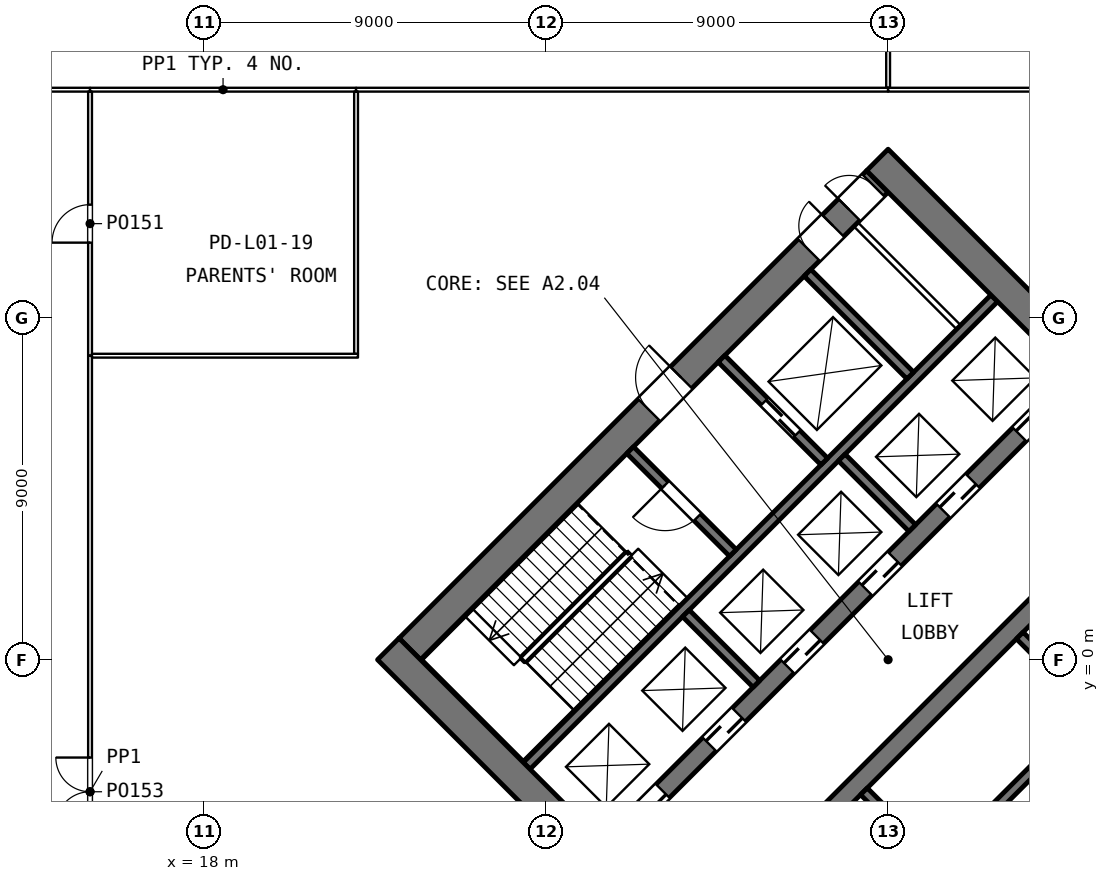
"""IFC4 building model, lengths in metres.
Left out: names, types, materials, properties, quantities, classifications, styles, units other than length and angle.
Written with IfcOpenShell. Run it as: python <this file> out.ifc"""

import sys

from ifc_helpers import new_model, si_unit, direction, frame, frame_2d, origin, place, context, subcontext, project, spatial, rectangle, extrude, element, fill, save


model = new_model("IFC4")
c1 = context("Model", 3, precision=1e-05, world=origin(), true_north=direction((0.0, 1.0)))
c2 = subcontext(c1, "Body", "Model", "MODEL_VIEW")
j1 = project(units=[si_unit("LENGTHUNIT", "METRE"), si_unit("PLANEANGLEUNIT", "RADIAN")], contexts=[c1])
p1 = place(None, origin())
s1 = spatial("IfcSite", under=j1, at=p1, CompositionType="ELEMENT")
p2 = place(p1, origin())
s2 = spatial("IfcBuilding", under=s1, at=p2, CompositionType="ELEMENT")
p3 = place(p2, frame((0.0, 0.0, 7.2)))
s3 = spatial("IfcBuildingStorey", under=s2, at=p3, CompositionType="ELEMENT", Elevation=7.2)
p4 = place(p3, frame((36.283, -12.586, 0.0), z_axis=(0.0, 0.0, 1.0), x_axis=(0.707106781187, 0.707106781187, 0.0)))
e1 = element("IfcWall", 1, at=p4, inside=s3, PredefinedType="SHEAR", context=c2, shape_type="SweptSolid", body=[
    extrude(rectangle(XDim=17.4, YDim=0.8, at=frame_2d((8.7, 0.0))), origin(), (0.0, 0.0, 1.0), 5.1),
])
p5 = place(p4, frame((7.3, 0.0, 0.0)))
e2 = element("IfcOpeningElement", 2, at=p5, cuts=e1, PredefinedType="OPENING", context=c2, shape_type="SweptSolid", body=[
    extrude(rectangle(XDim=1.2, YDim=2.1, at=frame_2d((0.6, 1.05))), frame((0.0, 0.41, 0.0), z_axis=(0.0, -1.0, 0.0), x_axis=(1.0, 0.0, 0.0)), (0.0, 0.0, 1.0), 0.82),
])
p6 = place(p4, frame((1.0, 0.0, 0.0)))
e3 = element("IfcOpeningElement", 3, at=p6, cuts=e1, PredefinedType="OPENING", context=c2, shape_type="SweptSolid", body=[
    extrude(rectangle(XDim=1.0, YDim=2.1, at=frame_2d((0.5, 1.05))), frame((0.0, 0.41, 0.0), z_axis=(0.0, -1.0, 0.0), x_axis=(1.0, 0.0, 0.0)), (0.0, 0.0, 1.0), 0.82),
])
p7 = place(p3, frame((33.207, -9.51, 0.0), z_axis=(0.0, 0.0, 1.0), x_axis=(0.707106781187, 0.707106781187, 0.0)))
e4 = element("IfcWall", 4, at=p7, inside=s3, PredefinedType="SHEAR", context=c2, shape_type="SweptSolid", body=[
    extrude(rectangle(XDim=17.4, YDim=0.25, at=frame_2d((8.7, 0.0))), origin(), (0.0, 0.0, 1.0), 5.1),
])
p8 = place(p3, frame((31.086, -7.389, 0.0), z_axis=(0.0, 0.0, 1.0), x_axis=(0.707106781187, 0.707106781187, 0.0)))
e5 = element("IfcWall", 5, at=p8, inside=s3, PredefinedType="SHEAR", context=c2, shape_type="SweptSolid", body=[
    extrude(rectangle(XDim=17.4, YDim=0.5, at=frame_2d((8.7, 0.0))), origin(), (0.0, 0.0, 1.0), 5.1),
])
p9 = place(p8, frame((12.45, 0.0, 0.0)))
e6 = element("IfcOpeningElement", 6, at=p9, cuts=e5, PredefinedType="OPENING", context=c2, shape_type="SweptSolid", body=[
    extrude(rectangle(XDim=1.2, YDim=2.1, at=frame_2d((0.6, 1.05))), frame((0.0, 0.26, 0.0), z_axis=(0.0, -1.0, 0.0), x_axis=(1.0, 0.0, 0.0)), (0.0, 0.0, 1.0), 0.52),
])
p10 = place(p8, frame((15.5, 0.0, 0.0)))
e7 = element("IfcOpeningElement", 7, at=p10, cuts=e5, PredefinedType="OPENING", context=c2, shape_type="SweptSolid", body=[
    extrude(rectangle(XDim=1.0, YDim=2.1, at=frame_2d((0.5, 1.05))), frame((0.0, 0.26, 0.0), z_axis=(0.0, -1.0, 0.0), x_axis=(1.0, 0.0, 0.0)), (0.0, 0.0, 1.0), 0.52),
])
p11 = place(p3, frame((28.611, -4.914, 0.0), z_axis=(0.0, 0.0, 1.0), x_axis=(0.707106781187, 0.707106781187, 0.0)))
e8 = element("IfcWall", 8, at=p11, inside=s3, PredefinedType="SHEAR", context=c2, shape_type="SweptSolid", body=[
    extrude(rectangle(XDim=17.4, YDim=0.5, at=frame_2d((8.7, 0.0))), origin(), (0.0, 0.0, 1.0), 5.1),
])
p12 = place(p11, frame((0.962, 0.0, 0.0)))
e9 = element("IfcOpeningElement", 9, at=p12, cuts=e8, PredefinedType="OPENING", context=c2, shape_type="SweptSolid", body=[
    extrude(rectangle(XDim=1.1, YDim=2.1, at=frame_2d((0.55, 1.05))), frame((0.0, 0.26, 0.0), z_axis=(0.0, -1.0, 0.0), x_axis=(1.0, 0.0, 0.0)), (0.0, 0.0, 1.0), 0.52),
])
p13 = place(p11, frame((3.8, 0.0, 0.0)))
e10 = element("IfcOpeningElement", 10, at=p13, cuts=e8, PredefinedType="OPENING", context=c2, shape_type="SweptSolid", body=[
    extrude(rectangle(XDim=1.1, YDim=2.1, at=frame_2d((0.55, 1.05))), frame((0.0, 0.26, 0.0), z_axis=(0.0, -1.0, 0.0), x_axis=(1.0, 0.0, 0.0)), (0.0, 0.0, 1.0), 0.52),
])
p14 = place(p11, frame((6.7, 0.0, 0.0)))
e11 = element("IfcOpeningElement", 11, at=p14, cuts=e8, PredefinedType="OPENING", context=c2, shape_type="SweptSolid", body=[
    extrude(rectangle(XDim=1.1, YDim=2.1, at=frame_2d((0.55, 1.05))), frame((0.0, 0.26, 0.0), z_axis=(0.0, -1.0, 0.0), x_axis=(1.0, 0.0, 0.0)), (0.0, 0.0, 1.0), 0.52),
])
p15 = place(p11, frame((9.6, 0.0, 0.0)))
e12 = element("IfcOpeningElement", 12, at=p15, cuts=e8, PredefinedType="OPENING", context=c2, shape_type="SweptSolid", body=[
    extrude(rectangle(XDim=1.1, YDim=2.1, at=frame_2d((0.55, 1.05))), frame((0.0, 0.26, 0.0), z_axis=(0.0, -1.0, 0.0), x_axis=(1.0, 0.0, 0.0)), (0.0, 0.0, 1.0), 0.52),
])
p16 = place(p11, frame((12.5, 0.0, 0.0)))
e13 = element("IfcOpeningElement", 13, at=p16, cuts=e8, PredefinedType="OPENING", context=c2, shape_type="SweptSolid", body=[
    extrude(rectangle(XDim=1.1, YDim=2.1, at=frame_2d((0.55, 1.05))), frame((0.0, 0.26, 0.0), z_axis=(0.0, -1.0, 0.0), x_axis=(1.0, 0.0, 0.0)), (0.0, 0.0, 1.0), 0.52),
])
p17 = place(p11, frame((15.337, 0.0, 0.0)))
e14 = element("IfcOpeningElement", 14, at=p17, cuts=e8, PredefinedType="OPENING", context=c2, shape_type="SweptSolid", body=[
    extrude(rectangle(XDim=1.1, YDim=2.1, at=frame_2d((0.55, 1.05))), frame((0.0, 0.26, 0.0), z_axis=(0.0, -1.0, 0.0), x_axis=(1.0, 0.0, 0.0)), (0.0, 0.0, 1.0), 0.52),
])
p18 = place(p3, frame((26.49, -2.793, 0.0), z_axis=(0.0, 0.0, 1.0), x_axis=(0.707106781187, 0.707106781187, 0.0)))
e15 = element("IfcWall", 15, at=p18, inside=s3, PredefinedType="SHEAR", context=c2, shape_type="SweptSolid", body=[
    extrude(rectangle(XDim=17.4, YDim=0.25, at=frame_2d((8.7, 0.0))), origin(), (0.0, 0.0, 1.0), 5.1),
])
p19 = place(p3, frame((23.414, 0.283, 0.0), z_axis=(0.0, 0.0, 1.0), x_axis=(0.707106781187, 0.707106781187, 0.0)))
e16 = element("IfcWall", 16, at=p19, inside=s3, PredefinedType="SHEAR", context=c2, shape_type="SweptSolid", body=[
    extrude(rectangle(XDim=17.4, YDim=0.8, at=frame_2d((8.7, 0.0))), origin(), (0.0, 0.0, 1.0), 5.1),
])
p20 = place(p19, frame((8.9, 0.0, 0.0)))
e17 = element("IfcOpeningElement", 17, at=p20, cuts=e16, PredefinedType="OPENING", context=c2, shape_type="SweptSolid", body=[
    extrude(rectangle(XDim=1.2, YDim=2.1, at=frame_2d((0.6, 1.05))), frame((0.0, 0.41, 0.0), z_axis=(0.0, -1.0, 0.0), x_axis=(1.0, 0.0, 0.0)), (0.0, 0.0, 1.0), 0.82),
])
p21 = place(p19, frame((14.85, 0.0, 0.0)))
e18 = element("IfcOpeningElement", 18, at=p21, cuts=e16, PredefinedType="OPENING", context=c2, shape_type="SweptSolid", body=[
    extrude(rectangle(XDim=0.9, YDim=2.1, at=frame_2d((0.45, 1.05))), frame((0.0, 0.41, 0.0), z_axis=(0.0, -1.0, 0.0), x_axis=(1.0, 0.0, 0.0)), (0.0, 0.0, 1.0), 0.82),
])
p22 = place(p19, frame((16.35, 0.0, 0.0)))
e19 = element("IfcOpeningElement", 19, at=p22, cuts=e16, PredefinedType="OPENING", context=c2, shape_type="SweptSolid", body=[
    extrude(rectangle(XDim=0.9, YDim=2.1, at=frame_2d((0.45, 1.05))), frame((0.0, 0.41, 0.0), z_axis=(0.0, -1.0, 0.0), x_axis=(1.0, 0.0, 0.0)), (0.0, 0.0, 1.0), 0.82),
])
p23 = place(p3, frame((36.283, -13.152, 0.0), z_axis=(0.0, 0.0, 1.0), x_axis=(-0.707106781187, 0.707106781187, 0.0)))
e20 = element("IfcWall", 20, at=p23, inside=s3, PredefinedType="SHEAR", context=c2, shape_type="SweptSolid", body=[
    extrude(rectangle(XDim=19.0, YDim=0.8, at=frame_2d((9.5, 0.0))), origin(), (0.0, 0.0, 1.0), 5.1),
])
p24 = place(p23, frame((8.3, 0.0, 0.0)))
e21 = element("IfcOpeningElement", 21, at=p24, cuts=e20, PredefinedType="OPENING", context=c2, shape_type="SweptSolid", body=[
    extrude(rectangle(XDim=2.4, YDim=2.1, at=frame_2d((1.2, 1.05))), frame((0.0, 0.41, 0.0), z_axis=(0.0, -1.0, 0.0), x_axis=(1.0, 0.0, 0.0)), (0.0, 0.0, 1.0), 0.82),
])
for number, where, z_axis, x_axis in (
    (22, (37.22, -5.321, 0.0), (0.0, 0.0, 1.0), (-0.707, 0.707, 0.0)),
    (23, (32.535, -0.636, 0.0), (0.0, 0.0, 1.0), (-0.707, 0.707, 0.0)),
):
    element("IfcWall", number, at=place(p3, frame(where, z_axis=z_axis, x_axis=x_axis)), inside=s3, PredefinedType="SHEAR", context=c2, shape_type="SweptSolid", body=[
        extrude(rectangle(XDim=2.625, YDim=0.25, at=frame_2d((1.312, 0.0))), origin(), (0.0, 0.0, 1.0), 5.1),
    ])
p25 = place(p3, frame((31.917, 2.811, 0.0), z_axis=(0.0, 0.0, 1.0), x_axis=(-0.707106781187, 0.707106781187, 0.0)))
e24 = element("IfcWall", 24, at=p25, inside=s3, PredefinedType="SHEAR", context=c2, shape_type="SweptSolid", body=[
    extrude(rectangle(XDim=3.825, YDim=0.25, at=frame_2d((1.913, 0.0))), origin(), (0.0, 0.0, 1.0), 5.1),
])
p26 = place(p25, frame((1.325, 0.0, 0.0)))
e25 = element("IfcOpeningElement", 25, at=p26, cuts=e24, PredefinedType="OPENING", context=c2, shape_type="SweptSolid", body=[
    extrude(rectangle(XDim=1.2, YDim=2.1, at=frame_2d((0.6, 1.05))), frame((0.0, 0.135, 0.0), z_axis=(0.0, -1.0, 0.0), x_axis=(1.0, 0.0, 0.0)), (0.0, 0.0, 1.0), 0.27),
])
p27 = place(p3, frame((34.321, 5.215, 0.0), z_axis=(0.0, 0.0, 1.0), x_axis=(-0.707074866995, 0.707138693938, 0.0)))
e26 = element("IfcWall", 26, at=p27, inside=s3, PredefinedType="SHEAR", context=c2, shape_type="SweptSolid", body=[
    extrude(rectangle(XDim=3.825, YDim=0.25, at=frame_2d((1.913, 0.0))), origin(), (0.0, 0.0, 1.0), 5.1),
])
p28 = place(p27, frame((1.025, 0.0, 0.0)))
e27 = element("IfcOpeningElement", 27, at=p28, cuts=e26, PredefinedType="OPENING", context=c2, shape_type="SweptSolid", body=[
    extrude(rectangle(XDim=1.2, YDim=2.1, at=frame_2d((0.6, 1.05))), frame((0.0, 0.135, 0.0), z_axis=(0.0, -1.0, 0.0), x_axis=(1.0, 0.0, 0.0)), (0.0, 0.0, 1.0), 0.27),
])
for number, where, z_axis, x_axis in (
    (28, (41.321, -1.22, 0.0), (0.0, 0.0, 1.0), (-0.707, 0.707, 0.0)),
    (29, (36.636, 3.465, 0.0), (0.0, 0.0, 1.0), (-0.707, 0.707, 0.0)),
):
    element("IfcWall", number, at=place(p3, frame(where, z_axis=z_axis, x_axis=x_axis)), inside=s3, PredefinedType="SHEAR", context=c2, shape_type="SweptSolid", body=[
        extrude(rectangle(XDim=2.625, YDim=0.25, at=frame_2d((1.312, 0.0))), origin(), (0.0, 0.0, 1.0), 5.1),
    ])
p29 = place(p3, frame((36.583, 7.478, 0.0), z_axis=(0.0, 0.0, 1.0), x_axis=(-0.707138693938, 0.707074866995, 0.0)))
e30 = element("IfcWall", 30, at=p29, inside=s3, PredefinedType="SHEAR", context=c2, shape_type="SweptSolid", body=[
    extrude(rectangle(XDim=3.825, YDim=0.25, at=frame_2d((1.913, 0.0))), origin(), (0.0, 0.0, 1.0), 5.1),
])
p30 = place(p3, frame((37.856, 8.75, 0.0), z_axis=(0.0, 0.0, 1.0), x_axis=(-0.707106781187, 0.707106781187, 0.0)))
e31 = element("IfcWall", 31, at=p30, inside=s3, PredefinedType="PARTITIONING", context=c2, shape_type="SweptSolid", body=[
    extrude(rectangle(XDim=3.825, YDim=0.15, at=frame_2d((1.913, 0.0))), origin(), (0.0, 0.0, 1.0), 5.1),
])
p31 = place(p3, frame((49.152, -0.283, 0.0), z_axis=(0.0, 0.0, 1.0), x_axis=(-0.707106781187, 0.707106781187, 0.0)))
e32 = element("IfcWall", 32, at=p31, inside=s3, PredefinedType="SHEAR", context=c2, shape_type="SweptSolid", body=[
    extrude(rectangle(XDim=19.0, YDim=0.8, at=frame_2d((9.5, 0.0))), origin(), (0.0, 0.0, 1.0), 5.1),
])
p32 = place(p31, frame((8.3, 0.0, 0.0)))
e33 = element("IfcOpeningElement", 33, at=p32, cuts=e32, PredefinedType="OPENING", context=c2, shape_type="SweptSolid", body=[
    extrude(rectangle(XDim=2.4, YDim=2.1, at=frame_2d((1.2, 1.05))), frame((0.0, 0.41, 0.0), z_axis=(0.0, -1.0, 0.0), x_axis=(1.0, 0.0, 0.0)), (0.0, 0.0, 1.0), 0.82),
])
p33 = place(p3, frame((36.0, 15.05, 0.0), z_axis=(0.0, 0.0, 1.0), x_axis=(0.0, 1.0, 0.0)))
e34 = element("IfcWall", 34, at=p33, inside=s3, PredefinedType="PARTITIONING", context=c2, shape_type="SweptSolid", body=[
    extrude(rectangle(XDim=17.55, YDim=0.1, at=frame_2d((8.775, 0.0))), origin(), (0.0, 0.0, 1.0), 4.11),
])
p34 = place(p33, frame((6.739, 0.0, 0.0)))
e35 = element("IfcOpeningElement", 35, at=p34, cuts=e34, PredefinedType="OPENING", context=c2, shape_type="SweptSolid", body=[
    extrude(rectangle(XDim=1.8, YDim=2.1, at=frame_2d((0.9, 1.05))), frame((0.0, 0.06, 0.0), z_axis=(0.0, -1.0, 0.0), x_axis=(1.0, 0.0, 0.0)), (0.0, 0.0, 1.0), 0.12),
])
p35 = place(p3, frame((-15.0, 15.0, 0.0), z_axis=(0.0, 0.0, 1.0), x_axis=(1.0, 0.0, 0.0)))
e36 = element("IfcWall", 36, at=p35, inside=s3, PredefinedType="PARTITIONING", context=c2, shape_type="SweptSolid", body=[
    extrude(rectangle(XDim=30.0, YDim=0.1, at=frame_2d((15.0, 0.0))), origin(), (0.0, 0.0, 1.0), 5.1),
])
p36 = place(p35, frame((8.58, 0.0, 0.0)))
e37 = element("IfcOpeningElement", 37, at=p36, cuts=e36, PredefinedType="OPENING", context=c2, shape_type="SweptSolid", body=[
    extrude(rectangle(XDim=1.8, YDim=2.1, at=frame_2d((0.9, 1.05))), frame((0.0, 0.06, 0.0), z_axis=(0.0, -1.0, 0.0), x_axis=(1.0, 0.0, 0.0)), (0.0, 0.0, 1.0), 0.12),
])
p37 = place(p35, frame((19.62, 0.0, 0.0)))
e38 = element("IfcOpeningElement", 38, at=p37, cuts=e36, PredefinedType="OPENING", context=c2, shape_type="SweptSolid", body=[
    extrude(rectangle(XDim=1.8, YDim=2.1, at=frame_2d((0.9, 1.05))), frame((0.0, 0.06, 0.0), z_axis=(0.0, -1.0, 0.0), x_axis=(1.0, 0.0, 0.0)), (0.0, 0.0, 1.0), 0.12),
])
p38 = place(p3, frame((15.0, 15.0, 0.0), z_axis=(0.0, 0.0, 1.0), x_axis=(1.0, 0.0, 0.0)))
e39 = element("IfcWall", 39, at=p38, inside=s3, PredefinedType="PARTITIONING", context=c2, shape_type="SweptSolid", body=[
    extrude(rectangle(XDim=7.0, YDim=0.1, at=frame_2d((3.5, 0.0))), origin(), (0.0, 0.0, 1.0), 5.1),
])
p39 = place(p3, frame((22.0, 15.0, 0.0), z_axis=(0.0, 0.0, 1.0), x_axis=(1.0, 0.0, 0.0)))
e40 = element("IfcWall", 40, at=p39, inside=s3, PredefinedType="PARTITIONING", context=c2, shape_type="SweptSolid", body=[
    extrude(rectangle(XDim=14.0, YDim=0.1, at=frame_2d((7.0, 0.0))), origin(), (0.0, 0.0, 1.0), 5.1),
])
p40 = place(p3, frame((36.0, 15.0, 0.0), z_axis=(0.0, 0.0, 1.0), x_axis=(1.0, 0.0, 0.0)))
e41 = element("IfcWall", 41, at=p40, inside=s3, PredefinedType="PARTITIONING", context=c2, shape_type="SweptSolid", body=[
    extrude(rectangle(XDim=16.0, YDim=0.1, at=frame_2d((8.0, 0.0))), origin(), (0.0, 0.0, 1.0), 5.1),
])
p41 = place(p3, frame((15.0, 8.0, 0.0), z_axis=(0.0, 0.0, 1.0), x_axis=(0.0, 1.0, 0.0)))
e42 = element("IfcWall", 42, at=p41, inside=s3, PredefinedType="PARTITIONING", context=c2, shape_type="SweptSolid", body=[
    extrude(rectangle(XDim=6.95, YDim=0.1, at=frame_2d((3.475, 0.0))), origin(), (0.0, 0.0, 1.0), 5.1),
])
p42 = place(p41, frame((2.975, 0.0, 0.0)))
e43 = element("IfcOpeningElement", 43, at=p42, cuts=e42, PredefinedType="OPENING", context=c2, shape_type="SweptSolid", body=[
    extrude(rectangle(XDim=1.0, YDim=2.1, at=frame_2d((0.5, 1.05))), frame((0.0, 0.06, 0.0), z_axis=(0.0, -1.0, 0.0), x_axis=(1.0, 0.0, 0.0)), (0.0, 0.0, 1.0), 0.12),
])
p43 = place(p3, frame((15.0, -14.95, 0.0), z_axis=(0.0, 0.0, 1.0), x_axis=(0.0, 1.0, 0.0)))
e44 = element("IfcWall", 44, at=p43, inside=s3, PredefinedType="PARTITIONING", context=c2, shape_type="SweptSolid", body=[
    extrude(rectangle(XDim=22.95, YDim=0.1, at=frame_2d((11.475, 0.0))), origin(), (0.0, 0.0, 1.0), 5.1),
])
p44 = place(p43, frame((10.575, 0.0, 0.0)))
e45 = element("IfcOpeningElement", 45, at=p44, cuts=e44, PredefinedType="OPENING", context=c2, shape_type="SweptSolid", body=[
    extrude(rectangle(XDim=1.8, YDim=2.1, at=frame_2d((0.9, 1.05))), frame((0.0, 0.06, 0.0), z_axis=(0.0, -1.0, 0.0), x_axis=(1.0, 0.0, 0.0)), (0.0, 0.0, 1.0), 0.12),
])
p45 = place(p3, frame((15.05, 8.0, 0.0), z_axis=(0.0, 0.0, 1.0), x_axis=(1.0, 0.0, 0.0)))
e46 = element("IfcWall", 46, at=p45, inside=s3, PredefinedType="PARTITIONING", context=c2, shape_type="SweptSolid", body=[
    extrude(rectangle(XDim=7.0, YDim=0.1, at=frame_2d((3.5, 0.0))), origin(), (0.0, 0.0, 1.0), 5.1),
])
p46 = place(p3, frame((22.0, 8.05, 0.0), z_axis=(0.0, 0.0, 1.0), x_axis=(0.0, 1.0, 0.0)))
e47 = element("IfcWall", 47, at=p46, inside=s3, PredefinedType="PARTITIONING", context=c2, shape_type="SweptSolid", body=[
    extrude(rectangle(XDim=6.9, YDim=0.1, at=frame_2d((3.45, 0.0))), origin(), (0.0, 0.0, 1.0), 5.1),
])
p47 = place(p12, origin())
e48 = element("IfcDoor", 48, at=p47, inside=s3, OperationType="SLIDING_TO_LEFT", PredefinedType="DOOR", context=c2, shape_type="SweptSolid", body=[
    extrude(rectangle(XDim=1.1, YDim=2.1, at=frame_2d((0.55, 1.05))), frame((0.0, 0.025, 0.0), z_axis=(0.0, -1.0, 0.0), x_axis=(1.0, 0.0, 0.0)), (0.0, 0.0, 1.0), 0.05),
])
fill(e9, e48)
p48 = place(p13, origin())
e49 = element("IfcDoor", 49, at=p48, inside=s3, OperationType="SLIDING_TO_LEFT", PredefinedType="DOOR", context=c2, shape_type="SweptSolid", body=[
    extrude(rectangle(XDim=1.1, YDim=2.1, at=frame_2d((0.55, 1.05))), frame((0.0, 0.025, 0.0), z_axis=(0.0, -1.0, 0.0), x_axis=(1.0, 0.0, 0.0)), (0.0, 0.0, 1.0), 0.05),
])
fill(e10, e49)
p49 = place(p14, origin())
e50 = element("IfcDoor", 50, at=p49, inside=s3, OperationType="SLIDING_TO_LEFT", PredefinedType="DOOR", context=c2, shape_type="SweptSolid", body=[
    extrude(rectangle(XDim=1.1, YDim=2.1, at=frame_2d((0.55, 1.05))), frame((0.0, 0.025, 0.0), z_axis=(0.0, -1.0, 0.0), x_axis=(1.0, 0.0, 0.0)), (0.0, 0.0, 1.0), 0.05),
])
fill(e11, e50)
p50 = place(p15, origin())
e51 = element("IfcDoor", 51, at=p50, inside=s3, OperationType="SLIDING_TO_LEFT", PredefinedType="DOOR", context=c2, shape_type="SweptSolid", body=[
    extrude(rectangle(XDim=1.1, YDim=2.1, at=frame_2d((0.55, 1.05))), frame((0.0, 0.025, 0.0), z_axis=(0.0, -1.0, 0.0), x_axis=(1.0, 0.0, 0.0)), (0.0, 0.0, 1.0), 0.05),
])
fill(e12, e51)
p51 = place(p16, origin())
e52 = element("IfcDoor", 52, at=p51, inside=s3, OperationType="SLIDING_TO_LEFT", PredefinedType="DOOR", context=c2, shape_type="SweptSolid", body=[
    extrude(rectangle(XDim=1.1, YDim=2.1, at=frame_2d((0.55, 1.05))), frame((0.0, 0.025, 0.0), z_axis=(0.0, -1.0, 0.0), x_axis=(1.0, 0.0, 0.0)), (0.0, 0.0, 1.0), 0.05),
])
fill(e13, e52)
p52 = place(p17, origin())
e53 = element("IfcDoor", 53, at=p52, inside=s3, OperationType="SLIDING_TO_LEFT", PredefinedType="DOOR", context=c2, shape_type="SweptSolid", body=[
    extrude(rectangle(XDim=1.1, YDim=2.1, at=frame_2d((0.55, 1.05))), frame((0.0, 0.025, 0.0), z_axis=(0.0, -1.0, 0.0), x_axis=(1.0, 0.0, 0.0)), (0.0, 0.0, 1.0), 0.05),
])
fill(e14, e53)
p53 = place(p28, origin())
e54 = element("IfcDoor", 54, at=p53, inside=s3, OperationType="SLIDING_TO_LEFT", PredefinedType="DOOR", context=c2, shape_type="SweptSolid", body=[
    extrude(rectangle(XDim=1.2, YDim=2.1, at=frame_2d((0.6, 1.05))), frame((0.0, 0.025, 0.0), z_axis=(0.0, -1.0, 0.0), x_axis=(1.0, 0.0, 0.0)), (0.0, 0.0, 1.0), 0.05),
])
fill(e27, e54)
p54 = place(p26, origin())
e55 = element("IfcDoor", 55, at=p54, inside=s3, OperationType="SINGLE_SWING_RIGHT", PredefinedType="DOOR", context=c2, shape_type="SweptSolid", body=[
    extrude(rectangle(XDim=1.2, YDim=2.1, at=frame_2d((0.6, 1.05))), frame((0.0, 0.025, 0.0), z_axis=(0.0, -1.0, 0.0), x_axis=(1.0, 0.0, 0.0)), (0.0, 0.0, 1.0), 0.05),
])
fill(e25, e55)
p55 = place(p20, origin())
e56 = element("IfcDoor", 56, at=p55, inside=s3, OperationType="SINGLE_SWING_RIGHT", PredefinedType="DOOR", context=c2, shape_type="SweptSolid", body=[
    extrude(rectangle(XDim=1.2, YDim=2.1, at=frame_2d((0.6, 1.05))), frame((0.0, -0.225, 0.0), z_axis=(0.0, -1.0, 0.0), x_axis=(1.0, 0.0, 0.0)), (0.0, 0.0, 1.0), 0.05),
])
fill(e17, e56)
p56 = place(p21, origin())
e57 = element("IfcDoor", 57, at=p56, inside=s3, OperationType="SINGLE_SWING_RIGHT", PredefinedType="DOOR", context=c2, shape_type="SweptSolid", body=[
    extrude(rectangle(XDim=0.9, YDim=2.1, at=frame_2d((0.45, 1.05))), frame((0.0, -0.225, 0.0), z_axis=(0.0, -1.0, 0.0), x_axis=(1.0, 0.0, 0.0)), (0.0, 0.0, 1.0), 0.05),
])
fill(e18, e57)
p57 = place(p22, origin())
e58 = element("IfcDoor", 58, at=p57, inside=s3, OperationType="SINGLE_SWING_LEFT", PredefinedType="DOOR", context=c2, shape_type="SweptSolid", body=[
    extrude(rectangle(XDim=0.9, YDim=2.1, at=frame_2d((0.45, 1.05))), frame((0.0, -0.225, 0.0), z_axis=(0.0, -1.0, 0.0), x_axis=(1.0, 0.0, 0.0)), (0.0, 0.0, 1.0), 0.05),
])
fill(e19, e58)
p58 = place(p42, origin())
e59 = element("IfcDoor", 59, at=p58, inside=s3, OperationType="SINGLE_SWING_LEFT", PredefinedType="DOOR", context=c2, shape_type="SweptSolid", body=[
    extrude(rectangle(XDim=1.0, YDim=2.1, at=frame_2d((0.5, 1.05))), frame((0.0, 0.025, 0.0), z_axis=(0.0, -1.0, 0.0), x_axis=(1.0, 0.0, 0.0)), (0.0, 0.0, 1.0), 0.05),
])
fill(e43, e59)
p59 = place(p44, origin())
e60 = element("IfcDoor", 60, at=p59, inside=s3, OperationType="DOUBLE_DOOR_DOUBLE_SWING", PredefinedType="DOOR", context=c2, shape_type="SweptSolid", body=[
    extrude(rectangle(XDim=1.8, YDim=2.1, at=frame_2d((0.9, 1.05))), frame((0.0, 0.025, 0.0), z_axis=(0.0, -1.0, 0.0), x_axis=(1.0, 0.0, 0.0)), (0.0, 0.0, 1.0), 0.05),
])
fill(e45, e60)
save(model, sys.argv[1])
